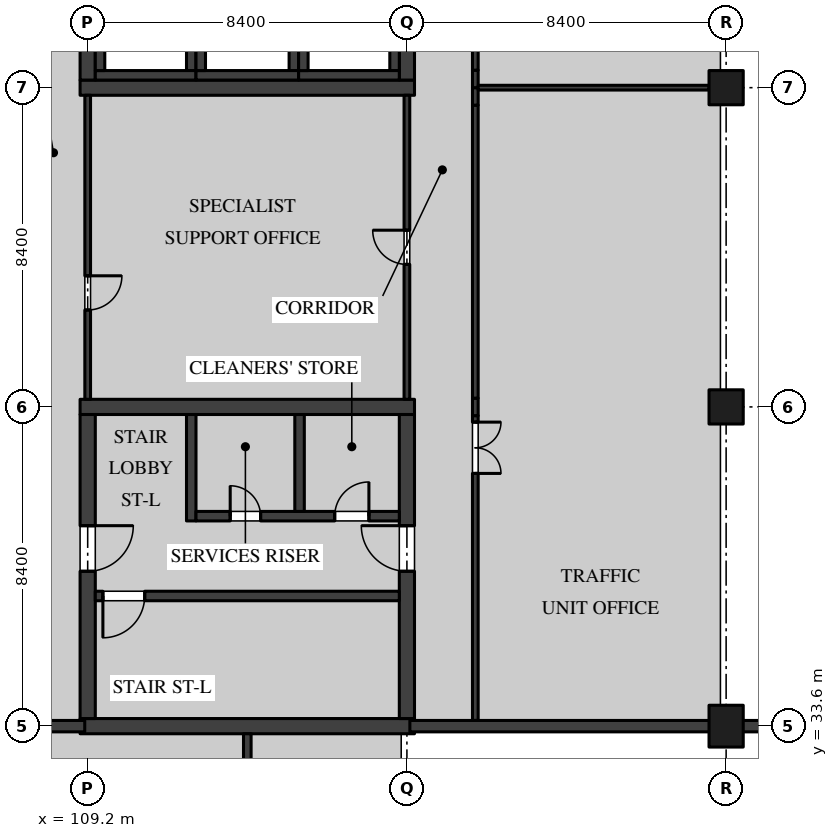
"""IFC4 building model, lengths in metres.
Left out: names, types, materials, properties, quantities, classifications, styles, units other than length and angle.
Written with IfcOpenShell. Run it as: python <this file> out.ifc"""

import sys

from ifc_helpers import new_model, si_unit, direction, frame, frame_2d, origin, origin_2d, place, context, subcontext, project, spatial, polyline, rectangle, outline, extrude, element, fill, save


model = new_model("IFC4")
c1 = context("Model", 3, precision=1e-05, world=origin(), true_north=direction((0.0, 1.0)))
c2 = subcontext(c1, "Body", "Model", "MODEL_VIEW")
j1 = project(units=[si_unit("LENGTHUNIT", "METRE"), si_unit("PLANEANGLEUNIT", "RADIAN")], contexts=[c1])
p1 = place(None, origin())
s1 = spatial("IfcSite", under=j1, at=p1, CompositionType="ELEMENT")
p2 = place(p1, origin())
s2 = spatial("IfcBuilding", under=s1, at=p2, CompositionType="ELEMENT")
p3 = place(p2, frame((0.0, 0.0, 5.4)))
s3 = spatial("IfcBuildingStorey", under=s2, at=p3, CompositionType="ELEMENT", Elevation=5.4)
p4 = place(p3, frame((126.0, 33.6, 0.0), z_axis=(0.0, 0.0, 1.0), x_axis=(1.0, 0.0, 0.0)))
e1 = element("IfcColumn", 1, at=p4, inside=s3, PredefinedType="COLUMN", context=c2, shape_type="SweptSolid", body=[
    extrude(rectangle(XDim=0.9, YDim=1.1, at=origin_2d()), origin(), (0.0, 0.0, 1.0), 4.37),
])
for number, where, z_axis, x_axis in (
    (2, (126.0, 42.0, 0.0), (0.0, 0.0, 1.0), (1.0, 0.0, 0.0)),
    (3, (126.0, 50.4, 0.0), (0.0, 0.0, 1.0), (1.0, 0.0, 0.0)),
):
    element("IfcColumn", number, at=place(p3, frame(where, z_axis=z_axis, x_axis=x_axis)), inside=s3, PredefinedType="COLUMN", context=c2, shape_type="SweptSolid", body=[
        extrude(rectangle(XDim=0.9, YDim=0.9, at=origin_2d()), origin(), (0.0, 0.0, 1.0), 4.37),
    ])
p5 = place(p3, frame((109.0, 50.4, 0.0), z_axis=(0.0, 0.0, 1.0), x_axis=(1.0, 0.0, 0.0)))
e4 = element("IfcWall", 4, at=p5, inside=s3, PredefinedType="SHEAR", context=c2, shape_type="SweptSolid", body=[
    extrude(rectangle(XDim=8.8, YDim=0.4, at=frame_2d((4.4, 0.0))), origin(), (0.0, 0.0, 1.0), 4.37),
])
p6 = place(p3, frame((109.2, 50.6, 0.0), z_axis=(0.0, 0.0, 1.0), x_axis=(0.0, 1.0, 0.0)))
e5 = element("IfcWall", 5, at=p6, inside=s3, PredefinedType="SHEAR", context=c2, shape_type="SweptSolid", body=[
    extrude(rectangle(XDim=8.0, YDim=0.4, at=frame_2d((4.0, 0.0))), origin(), (0.0, 0.0, 1.0), 4.37),
])
p7 = place(p6, frame((3.25, 0.0, 0.0)))
e6 = element("IfcOpeningElement", 6, at=p7, cuts=e5, PredefinedType="OPENING", context=c2, shape_type="SweptSolid", body=[
    extrude(rectangle(XDim=1.2, YDim=2.1, at=frame_2d((0.6, 1.05))), frame((0.0, 0.21, 0.0), z_axis=(0.0, -1.0, 0.0), x_axis=(1.0, 0.0, 0.0)), (0.0, 0.0, 1.0), 0.42),
])
p8 = place(p3, frame((117.6, 50.6, 0.0), z_axis=(0.0, 0.0, 1.0), x_axis=(0.0, 1.0, 0.0)))
e7 = element("IfcWall", 7, at=p8, inside=s3, PredefinedType="SHEAR", context=c2, shape_type="SweptSolid", body=[
    extrude(rectangle(XDim=8.0, YDim=0.4, at=frame_2d((4.0, 0.0))), origin(), (0.0, 0.0, 1.0), 4.37),
])
p9 = place(p8, frame((3.25, 0.0, 0.0)))
e8 = element("IfcOpeningElement", 8, at=p9, cuts=e7, PredefinedType="OPENING", context=c2, shape_type="SweptSolid", body=[
    extrude(rectangle(XDim=1.2, YDim=2.1, at=frame_2d((0.6, 1.05))), frame((0.0, 0.21, 0.0), z_axis=(0.0, -1.0, 0.0), x_axis=(1.0, 0.0, 0.0)), (0.0, 0.0, 1.0), 0.42),
])
p10 = place(p8, frame((6.0, 0.0, 0.0)))
e9 = element("IfcOpeningElement", 9, at=p10, cuts=e7, PredefinedType="OPENING", context=c2, shape_type="SweptSolid", body=[
    extrude(rectangle(XDim=1.2, YDim=2.1, at=frame_2d((0.6, 1.05))), frame((0.0, 0.21, 0.0), z_axis=(0.0, -1.0, 0.0), x_axis=(1.0, 0.0, 0.0)), (0.0, 0.0, 1.0), 0.42),
])
for number, where, z_axis, x_axis in (
    (10, (109.0, 33.6, 0.0), (0.0, 0.0, 1.0), (1.0, 0.0, 0.0)),
    (11, (109.0, 42.0, 0.0), (0.0, 0.0, 1.0), (1.0, 0.0, 0.0)),
):
    element("IfcWall", number, at=place(p3, frame(where, z_axis=z_axis, x_axis=x_axis)), inside=s3, PredefinedType="SHEAR", context=c2, shape_type="SweptSolid", body=[
        extrude(rectangle(XDim=8.8, YDim=0.4, at=frame_2d((4.4, 0.0))), origin(), (0.0, 0.0, 1.0), 4.37),
    ])
p11 = place(p3, frame((109.2, 33.8, 0.0), z_axis=(0.0, 0.0, 1.0), x_axis=(0.0, 1.0, 0.0)))
e12 = element("IfcWall", 12, at=p11, inside=s3, PredefinedType="SHEAR", context=c2, shape_type="SweptSolid", body=[
    extrude(rectangle(XDim=8.0, YDim=0.4, at=frame_2d((4.0, 0.0))), origin(), (0.0, 0.0, 1.0), 4.37),
])
p12 = place(p11, frame((3.875, 0.0, 0.0)))
e13 = element("IfcOpeningElement", 13, at=p12, cuts=e12, PredefinedType="OPENING", context=c2, shape_type="SweptSolid", body=[
    extrude(rectangle(XDim=1.2, YDim=2.1, at=frame_2d((0.6, 1.05))), frame((0.0, 0.21, 0.0), z_axis=(0.0, -1.0, 0.0), x_axis=(1.0, 0.0, 0.0)), (0.0, 0.0, 1.0), 0.42),
])
p13 = place(p3, frame((117.6, 33.8, 0.0), z_axis=(0.0, 0.0, 1.0), x_axis=(0.0, 1.0, 0.0)))
e14 = element("IfcWall", 14, at=p13, inside=s3, PredefinedType="SHEAR", context=c2, shape_type="SweptSolid", body=[
    extrude(rectangle(XDim=8.0, YDim=0.4, at=frame_2d((4.0, 0.0))), origin(), (0.0, 0.0, 1.0), 4.37),
])
p14 = place(p13, frame((3.875, 0.0, 0.0)))
e15 = element("IfcOpeningElement", 15, at=p14, cuts=e14, PredefinedType="OPENING", context=c2, shape_type="SweptSolid", body=[
    extrude(rectangle(XDim=1.2, YDim=2.1, at=frame_2d((0.6, 1.05))), frame((0.0, 0.21, 0.0), z_axis=(0.0, -1.0, 0.0), x_axis=(1.0, 0.0, 0.0)), (0.0, 0.0, 1.0), 0.42),
])
p15 = place(p3, frame((109.4, 37.025, 0.0), z_axis=(0.0, 0.0, 1.0), x_axis=(1.0, 0.0, 0.0)))
e16 = element("IfcWall", 16, at=p15, inside=s3, PredefinedType="SOLIDWALL", context=c2, shape_type="SweptSolid", body=[
    extrude(rectangle(XDim=8.0, YDim=0.25, at=frame_2d((4.0, 0.0))), origin(), (0.0, 0.0, 1.0), 4.37),
])
p16 = place(p15, frame((0.2, 0.0, 0.0)))
e17 = element("IfcOpeningElement", 17, at=p16, cuts=e16, PredefinedType="OPENING", context=c2, shape_type="SweptSolid", body=[
    extrude(rectangle(XDim=1.1, YDim=2.1, at=frame_2d((0.55, 1.05))), frame((0.0, 0.135, 0.0), z_axis=(0.0, -1.0, 0.0), x_axis=(1.0, 0.0, 0.0)), (0.0, 0.0, 1.0), 0.27),
])
p17 = place(p3, frame((111.925, 39.0, 0.0), z_axis=(0.0, 0.0, 1.0), x_axis=(0.0, 1.0, 0.0)))
e18 = element("IfcWall", 18, at=p17, inside=s3, PredefinedType="SOLIDWALL", context=c2, shape_type="SweptSolid", body=[
    extrude(rectangle(XDim=2.8, YDim=0.25, at=frame_2d((1.4, 0.0))), origin(), (0.0, 0.0, 1.0), 4.37),
])
p18 = place(p3, frame((112.05, 39.125, 0.0), z_axis=(0.0, 0.0, 1.0), x_axis=(1.0, 0.0, 0.0)))
e19 = element("IfcWall", 19, at=p18, inside=s3, PredefinedType="SOLIDWALL", context=c2, shape_type="SweptSolid", body=[
    extrude(rectangle(XDim=5.35, YDim=0.25, at=frame_2d((2.675, 0.0))), origin(), (0.0, 0.0, 1.0), 4.37),
])
p19 = place(p18, frame((3.65, 0.0, 0.0)))
e20 = element("IfcOpeningElement", 20, at=p19, cuts=e19, PredefinedType="OPENING", context=c2, shape_type="SweptSolid", body=[
    extrude(rectangle(XDim=0.9, YDim=2.1, at=frame_2d((0.45, 1.05))), frame((0.0, 0.135, 0.0), z_axis=(0.0, -1.0, 0.0), x_axis=(1.0, 0.0, 0.0)), (0.0, 0.0, 1.0), 0.27),
])
p20 = place(p18, frame((0.9, 0.0, 0.0)))
e21 = element("IfcOpeningElement", 21, at=p20, cuts=e19, PredefinedType="OPENING", context=c2, shape_type="SweptSolid", body=[
    extrude(rectangle(XDim=0.8, YDim=2.1, at=frame_2d((0.4, 1.05))), frame((0.0, 0.135, 0.0), z_axis=(0.0, -1.0, 0.0), x_axis=(1.0, 0.0, 0.0)), (0.0, 0.0, 1.0), 0.27),
])
p21 = place(p3, frame((114.775, 39.25, 0.0), z_axis=(0.0, 0.0, 1.0), x_axis=(0.0, 1.0, 0.0)))
e22 = element("IfcWall", 22, at=p21, inside=s3, PredefinedType="SOLIDWALL", context=c2, shape_type="SweptSolid", body=[
    extrude(rectangle(XDim=2.55, YDim=0.25, at=frame_2d((1.275, 0.0))), origin(), (0.0, 0.0, 1.0), 4.37),
])
p22 = place(p3, frame((111.925, 50.85, 0.0), z_axis=(0.0, 0.0, 1.0), x_axis=(0.0, 1.0, 0.0)))
e23 = element("IfcWall", 23, at=p22, inside=s3, PredefinedType="SOLIDWALL", context=c2, shape_type="SweptSolid", body=[
    extrude(rectangle(XDim=2.3, YDim=0.25, at=frame_2d((1.15, 0.0))), origin(), (0.0, 0.0, 1.0), 4.37),
])
p23 = place(p3, frame((109.4, 50.725, 0.0), z_axis=(0.0, 0.0, 1.0), x_axis=(1.0, 0.0, 0.0)))
e24 = element("IfcWall", 24, at=p23, inside=s3, PredefinedType="SOLIDWALL", context=c2, shape_type="SweptSolid", body=[
    extrude(rectangle(XDim=2.65, YDim=0.25, at=frame_2d((1.325, 0.0))), origin(), (0.0, 0.0, 1.0), 4.37),
])
for number, where, z_axis, x_axis in (
    (25, (109.525, 50.85, 0.0), (0.0, 0.0, 1.0), (0.0, 1.0, 0.0)),
    (26, (114.625, 50.85, 0.0), (0.0, 0.0, 1.0), (0.0, 1.0, 0.0)),
):
    element("IfcWall", number, at=place(p3, frame(where, z_axis=z_axis, x_axis=x_axis)), inside=s3, PredefinedType="SOLIDWALL", context=c2, shape_type="SweptSolid", body=[
        extrude(rectangle(XDim=2.3, YDim=0.25, at=frame_2d((1.15, 0.0))), origin(), (0.0, 0.0, 1.0), 4.37),
    ])
p24 = place(p3, frame((112.05, 50.725, 0.0), z_axis=(0.0, 0.0, 1.0), x_axis=(1.0, 0.0, 0.0)))
e27 = element("IfcWall", 27, at=p24, inside=s3, PredefinedType="SOLIDWALL", context=c2, shape_type="SweptSolid", body=[
    extrude(rectangle(XDim=2.7, YDim=0.25, at=frame_2d((1.35, 0.0))), origin(), (0.0, 0.0, 1.0), 4.37),
])
for number, where, z_axis, x_axis in (
    (28, (112.175, 50.85, 0.0), (0.0, 0.0, 1.0), (0.0, 1.0, 0.0)),
    (29, (117.275, 50.85, 0.0), (0.0, 0.0, 1.0), (0.0, 1.0, 0.0)),
):
    element("IfcWall", number, at=place(p3, frame(where, z_axis=z_axis, x_axis=x_axis)), inside=s3, PredefinedType="SOLIDWALL", context=c2, shape_type="SweptSolid", body=[
        extrude(rectangle(XDim=2.3, YDim=0.25, at=frame_2d((1.15, 0.0))), origin(), (0.0, 0.0, 1.0), 4.37),
    ])
p25 = place(p3, frame((114.75, 50.725, 0.0), z_axis=(0.0, 0.0, 1.0), x_axis=(1.0, 0.0, 0.0)))
e30 = element("IfcWall", 30, at=p25, inside=s3, PredefinedType="SOLIDWALL", context=c2, shape_type="SweptSolid", body=[
    extrude(rectangle(XDim=2.65, YDim=0.25, at=frame_2d((1.325, 0.0))), origin(), (0.0, 0.0, 1.0), 4.37),
])
p26 = place(p3, frame((114.875, 50.85, 0.0), z_axis=(0.0, 0.0, 1.0), x_axis=(0.0, 1.0, 0.0)))
e31 = element("IfcWall", 31, at=p26, inside=s3, PredefinedType="SOLIDWALL", context=c2, shape_type="SweptSolid", body=[
    extrude(rectangle(XDim=2.3, YDim=0.25, at=frame_2d((1.15, 0.0))), origin(), (0.0, 0.0, 1.0), 4.37),
])
p27 = place(p2, origin())
s4 = spatial("IfcBuildingStorey", under=s2, at=p27, CompositionType="ELEMENT", Elevation=0.0)
p28 = place(p27, frame((117.6, 25.65, 0.0), z_axis=(0.0, 0.0, 1.0), x_axis=(0.0, 1.0, 0.0)))
e32 = element("IfcWall", 32, at=p28, inside=s4, PredefinedType="PARTITIONING", context=c2, shape_type="SweptSolid", body=[
    extrude(rectangle(XDim=7.75, YDim=0.25, at=frame_2d((3.875, 0.0))), origin(), (0.0, 0.0, 1.0), 8.375),
])
p29 = place(p3, frame((113.4, 18.9, 0.0), z_axis=(0.0, 0.0, 1.0), x_axis=(0.0, 1.0, 0.0)))
e33 = element("IfcWall", 33, at=p29, inside=s3, PredefinedType="PARTITIONING", context=c2, shape_type="SweptSolid", body=[
    extrude(rectangle(XDim=14.5, YDim=0.2, at=frame_2d((7.25, 0.0))), origin(), (0.0, 0.0, 1.0), 4.37),
])
p30 = place(p29, frame((6.15, 0.0, 0.0)))
e34 = element("IfcOpeningElement", 34, at=p30, cuts=e33, PredefinedType="OPENING", context=c2, shape_type="SweptSolid", body=[
    extrude(rectangle(XDim=2.4, YDim=2.7, at=frame_2d((1.2, 1.35))), frame((0.0, 0.11, 0.0), z_axis=(0.0, -1.0, 0.0), x_axis=(1.0, 0.0, 0.0)), (0.0, 0.0, 1.0), 0.22),
])
p31 = place(p3, frame((119.4, 33.75, 0.0), z_axis=(0.0, 0.0, 1.0), x_axis=(0.0, 1.0, 0.0)))
e35 = element("IfcWall", 35, at=p31, inside=s3, PredefinedType="PARTITIONING", context=c2, shape_type="SweptSolid", body=[
    extrude(rectangle(XDim=8.02, YDim=0.15, at=frame_2d((4.01, 0.0))), origin(), (0.0, 0.0, 1.0), 4.37),
])
p32 = place(p31, frame((6.5, 0.0, 0.0)))
e36 = element("IfcOpeningElement", 36, at=p32, cuts=e35, PredefinedType="OPENING", context=c2, shape_type="SweptSolid", body=[
    extrude(rectangle(XDim=1.35, YDim=2.1, at=frame_2d((0.675, 1.05))), frame((0.0, 0.085, 0.0), z_axis=(0.0, -1.0, 0.0), x_axis=(1.0, 0.0, 0.0)), (0.0, 0.0, 1.0), 0.17),
])
p33 = place(p3, frame((119.4, 41.77, 0.0), z_axis=(0.0, 0.0, 1.0), x_axis=(0.0, 1.0, 0.0)))
e37 = element("IfcWall", 37, at=p33, inside=s3, PredefinedType="PARTITIONING", context=c2, shape_type="SweptSolid", body=[
    extrude(rectangle(XDim=0.46, YDim=0.15, at=frame_2d((0.23, 0.0))), origin(), (0.0, 0.0, 1.0), 3.746),
])
p34 = place(p3, frame((119.4, 42.23, 0.0), z_axis=(0.0, 0.0, 1.0), x_axis=(0.0, 1.0, 0.0)))
e38 = element("IfcWall", 38, at=p34, inside=s3, PredefinedType="PARTITIONING", context=c2, shape_type="SweptSolid", body=[
    extrude(rectangle(XDim=7.71, YDim=0.15, at=frame_2d((3.855, 0.0))), origin(), (0.0, 0.0, 1.0), 4.37),
])
p35 = place(p3, frame((119.4, 49.94, 0.0), z_axis=(0.0, 0.0, 1.0), x_axis=(0.0, 1.0, 0.0)))
e39 = element("IfcWall", 39, at=p35, inside=s3, PredefinedType="PARTITIONING", context=c2, shape_type="SweptSolid", body=[
    extrude(rectangle(XDim=0.46, YDim=0.15, at=frame_2d((0.23, 0.0))), origin(), (0.0, 0.0, 1.0), 3.746),
])
p36 = place(p3, frame((119.4, 50.4, 0.0), z_axis=(0.0, 0.0, 1.0), x_axis=(0.0, 1.0, 0.0)))
e40 = element("IfcWall", 40, at=p36, inside=s3, PredefinedType="PARTITIONING", context=c2, shape_type="SweptSolid", body=[
    extrude(rectangle(XDim=0.46, YDim=0.15, at=frame_2d((0.23, 0.0))), origin(), (0.0, 0.0, 1.0), 3.746),
])
p37 = place(p3, frame((119.4, 50.86, 0.0), z_axis=(0.0, 0.0, 1.0), x_axis=(0.0, 1.0, 0.0)))
e41 = element("IfcWall", 41, at=p37, inside=s3, PredefinedType="PARTITIONING", context=c2, shape_type="SweptSolid", body=[
    extrude(rectangle(XDim=7.71, YDim=0.15, at=frame_2d((3.855, 0.0))), origin(), (0.0, 0.0, 1.0), 4.37),
])
p38 = place(p3, frame((117.6, 42.2, 0.0), z_axis=(0.0, 0.0, 1.0), x_axis=(0.0, 1.0, 0.0)))
e42 = element("IfcWall", 42, at=p38, inside=s3, PredefinedType="PARTITIONING", context=c2, shape_type="SweptSolid", body=[
    extrude(rectangle(XDim=8.0, YDim=0.15, at=frame_2d((4.0, 0.0))), origin(), (0.0, 0.0, 1.0), 3.746),
])
p39 = place(p38, frame((3.55, 0.0, 0.0)))
e43 = element("IfcOpeningElement", 43, at=p39, cuts=e42, PredefinedType="OPENING", context=c2, shape_type="SweptSolid", body=[
    extrude(rectangle(XDim=0.9, YDim=2.1, at=frame_2d((0.45, 1.05))), frame((0.0, 0.085, 0.0), z_axis=(0.0, -1.0, 0.0), x_axis=(1.0, 0.0, 0.0)), (0.0, 0.0, 1.0), 0.17),
])
p40 = place(p3, frame((109.2, 42.2, 0.0), z_axis=(0.0, 0.0, 1.0), x_axis=(0.0, 1.0, 0.0)))
e44 = element("IfcWall", 44, at=p40, inside=s3, PredefinedType="PARTITIONING", context=c2, shape_type="SweptSolid", body=[
    extrude(rectangle(XDim=8.0, YDim=0.15, at=frame_2d((4.0, 0.0))), origin(), (0.0, 0.0, 1.0), 3.746),
])
p41 = place(p40, frame((2.35, 0.0, 0.0)))
e45 = element("IfcOpeningElement", 45, at=p41, cuts=e44, PredefinedType="OPENING", context=c2, shape_type="SweptSolid", body=[
    extrude(rectangle(XDim=0.9, YDim=2.1, at=frame_2d((0.45, 1.05))), frame((0.0, 0.085, 0.0), z_axis=(0.0, -1.0, 0.0), x_axis=(1.0, 0.0, 0.0)), (0.0, 0.0, 1.0), 0.17),
])
p42 = place(p3, frame((119.475, 50.4, 0.0), z_axis=(0.0, 0.0, 1.0), x_axis=(1.0, 0.0, 0.0)))
e46 = element("IfcWall", 46, at=p42, inside=s3, PredefinedType="PARTITIONING", context=c2, shape_type="SweptSolid", body=[
    extrude(rectangle(XDim=6.075, YDim=0.125, at=frame_2d((3.038, 0.0))), origin(), (0.0, 0.0, 1.0), 3.746),
])
p43 = place(p3, frame((134.1, 33.6, 0.0), z_axis=(0.0, 0.0, 1.0), x_axis=(-1.0, 0.0, 0.0)))
e47 = element("IfcWall", 47, at=p43, inside=s3, PredefinedType="SOLIDWALL", context=c2, shape_type="SweptSolid", body=[
    extrude(outline(polyline([(0.0, 0.0), (7.67, 0.0), (7.67, 3.6), (7.65, 3.6), (0.0, 3.6), (0.0, 0.0)])), frame((0.0, 0.15, 0.0), z_axis=(0.0, -1.0, 0.0), x_axis=(1.0, 0.0, 0.0)), (0.0, 0.0, 1.0), 0.3),
])
p44 = place(p3, frame((117.678, 33.6, 0.0), z_axis=(0.0, 0.0, 1.0), x_axis=(1.0, 0.0, 0.0)))
e48 = element("IfcWall", 48, at=p44, inside=s3, PredefinedType="SOLIDWALL", context=c2, shape_type="SweptSolid", body=[
    extrude(outline(polyline([(0.0, 0.0), (7.892, 0.0), (7.892, 3.6), (7.872, 3.6), (0.122, 3.6), (0.0, 3.6), (0.0, 0.0)])), frame((0.0, 0.15, 0.0), z_axis=(0.0, -1.0, 0.0), x_axis=(1.0, 0.0, 0.0)), (0.0, 0.0, 1.0), 0.3),
])
p45 = place(p3, frame((109.122, 33.6, 0.0), z_axis=(0.0, 0.0, 1.0), x_axis=(-1.0, 0.0, 0.0)))
e49 = element("IfcWall", 49, at=p45, inside=s3, PredefinedType="SOLIDWALL", context=c2, shape_type="SweptSolid", body=[
    extrude(outline(polyline([(0.0, 0.0), (8.122, 0.0), (8.122, 3.6), (7.872, 3.6), (0.122, 3.6), (0.0, 3.6), (0.0, 0.0)])), frame((0.0, 0.15, 0.0), z_axis=(0.0, -1.0, 0.0), x_axis=(1.0, 0.0, 0.0)), (0.0, 0.0, 1.0), 0.3),
])
p46 = place(p19, origin())
e50 = element("IfcDoor", 50, at=p46, inside=s3, OperationType="SINGLE_SWING_LEFT", PredefinedType="DOOR", context=c2, shape_type="SweptSolid", body=[
    extrude(rectangle(XDim=0.9, YDim=2.1, at=frame_2d((0.45, 1.05))), frame((0.0, 0.035, 0.0), z_axis=(0.0, -1.0, 0.0), x_axis=(1.0, 0.0, 0.0)), (0.0, 0.0, 1.0), 0.07),
])
fill(e20, e50)
p47 = place(p12, frame((1.2, 0.0, 0.0), z_axis=(0.0, 0.0, 1.0), x_axis=(-1.0, 0.0, 0.0)))
e51 = element("IfcDoor", 51, at=p47, inside=s3, OperationType="SINGLE_SWING_RIGHT", PredefinedType="DOOR", context=c2, shape_type="SweptSolid", body=[
    extrude(rectangle(XDim=1.2, YDim=2.1, at=frame_2d((0.6, 1.05))), frame((0.0, 0.035, 0.0), z_axis=(0.0, -1.0, 0.0), x_axis=(1.0, 0.0, 0.0)), (0.0, 0.0, 1.0), 0.07),
])
fill(e13, e51)
p48 = place(p14, origin())
e52 = element("IfcDoor", 52, at=p48, inside=s3, OperationType="SINGLE_SWING_LEFT", PredefinedType="DOOR", context=c2, shape_type="SweptSolid", body=[
    extrude(rectangle(XDim=1.2, YDim=2.1, at=frame_2d((0.6, 1.05))), frame((0.0, 0.035, 0.0), z_axis=(0.0, -1.0, 0.0), x_axis=(1.0, 0.0, 0.0)), (0.0, 0.0, 1.0), 0.07),
])
fill(e15, e52)
p49 = place(p20, origin())
e53 = element("IfcDoor", 53, at=p49, inside=s3, OperationType="SINGLE_SWING_RIGHT", PredefinedType="DOOR", context=c2, shape_type="SweptSolid", body=[
    extrude(rectangle(XDim=0.8, YDim=2.1, at=frame_2d((0.4, 1.05))), frame((0.0, 0.035, 0.0), z_axis=(0.0, -1.0, 0.0), x_axis=(1.0, 0.0, 0.0)), (0.0, 0.0, 1.0), 0.07),
])
fill(e21, e53)
p50 = place(p16, frame((1.1, 0.0, 0.0), z_axis=(0.0, 0.0, 1.0), x_axis=(-1.0, 0.0, 0.0)))
e54 = element("IfcDoor", 54, at=p50, inside=s3, OperationType="SINGLE_SWING_LEFT", PredefinedType="DOOR", context=c2, shape_type="SweptSolid", body=[
    extrude(rectangle(XDim=1.1, YDim=2.1, at=frame_2d((0.55, 1.05))), frame((0.0, 0.035, 0.0), z_axis=(0.0, -1.0, 0.0), x_axis=(1.0, 0.0, 0.0)), (0.0, 0.0, 1.0), 0.07),
])
fill(e17, e54)
p51 = place(p32, frame((1.35, 0.0, 0.0), z_axis=(0.0, 0.0, 1.0), x_axis=(-1.0, 0.0, 0.0)))
e55 = element("IfcDoor", 55, at=p51, inside=s3, OperationType="DOUBLE_DOOR_SINGLE_SWING", PredefinedType="DOOR", context=c2, shape_type="SweptSolid", body=[
    extrude(rectangle(XDim=1.35, YDim=2.1, at=frame_2d((0.675, 1.05))), frame((0.0, 0.025, 0.0), z_axis=(0.0, -1.0, 0.0), x_axis=(1.0, 0.0, 0.0)), (0.0, 0.0, 1.0), 0.05),
])
fill(e36, e55)
p52 = place(p39, origin())
e56 = element("IfcDoor", 56, at=p52, inside=s3, OperationType="SINGLE_SWING_LEFT", PredefinedType="DOOR", context=c2, shape_type="SweptSolid", body=[
    extrude(rectangle(XDim=0.9, YDim=2.1, at=frame_2d((0.45, 1.05))), frame((0.0, 0.025, 0.0), z_axis=(0.0, -1.0, 0.0), x_axis=(1.0, 0.0, 0.0)), (0.0, 0.0, 1.0), 0.05),
])
fill(e43, e56)
p53 = place(p41, frame((0.9, 0.0, 0.0), z_axis=(0.0, 0.0, 1.0), x_axis=(-1.0, 0.0, 0.0)))
e57 = element("IfcDoor", 57, at=p53, inside=s3, OperationType="SINGLE_SWING_RIGHT", PredefinedType="DOOR", context=c2, shape_type="SweptSolid", body=[
    extrude(rectangle(XDim=0.9, YDim=2.1, at=frame_2d((0.45, 1.05))), frame((0.0, 0.025, 0.0), z_axis=(0.0, -1.0, 0.0), x_axis=(1.0, 0.0, 0.0)), (0.0, 0.0, 1.0), 0.05),
])
fill(e45, e57)
save(model, sys.argv[1])
